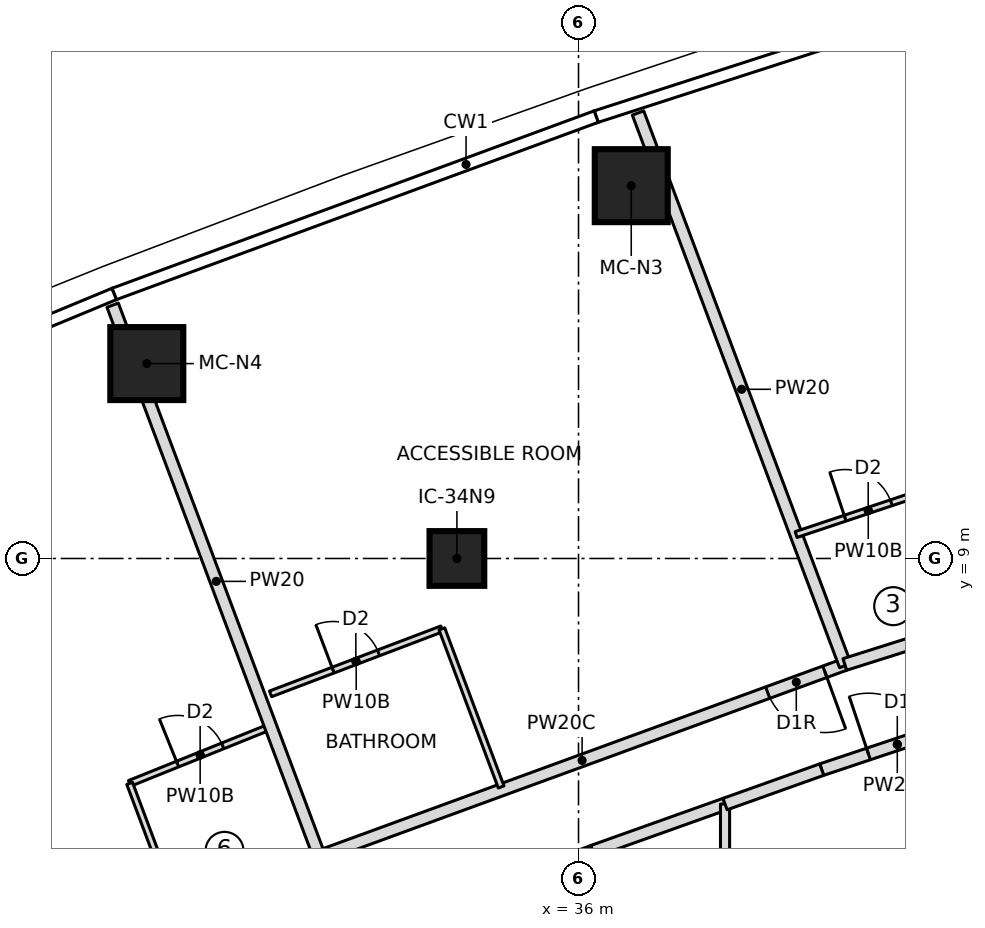
"""IFC4 building model, lengths in metres.
Left out: names, types, materials, properties, quantities, classifications, styles, units other than length and angle.
Written with IfcOpenShell. Run it as: python <this file> out.ifc"""

import sys

from ifc_helpers import new_model, si_unit, direction, frame, frame_2d, origin, origin_2d, place, context, subcontext, project, spatial, rectangle, extrude, element, fill, save


model = new_model("IFC4")
c1 = context("Model", 3, precision=1e-05, world=origin(), true_north=direction((0.0, 1.0)))
c2 = subcontext(c1, "Body", "Model", "MODEL_VIEW")
j1 = project(units=[si_unit("LENGTHUNIT", "METRE"), si_unit("PLANEANGLEUNIT", "RADIAN")], contexts=[c1])
p1 = place(None, origin())
s1 = spatial("IfcSite", under=j1, at=p1, CompositionType="ELEMENT")
p2 = place(p1, origin())
s2 = spatial("IfcBuilding", under=s1, at=p2, CompositionType="ELEMENT")
p3 = place(p2, frame((0.0, 0.0, 242.1)))
s3 = spatial("IfcBuildingStorey", under=s2, at=p3, CompositionType="ELEMENT", Elevation=242.1)
for number, where, z_axis, x_axis in (
    (1, (36.867, 15.132, 0.0), (0.0, 0.0, 1.0), (1.0, 0.0, 0.0)),
    (2, (28.9, 12.205, 0.0), (0.0, 0.0, 1.0), (1.0, 0.0, 0.0)),
):
    element("IfcColumn", number, at=place(p3, frame(where, z_axis=z_axis, x_axis=x_axis)), inside=s3, PredefinedType="COLUMN", context=c2, shape_type="SweptSolid", body=[
        extrude(rectangle(XDim=1.2, YDim=1.2, at=origin_2d()), origin(), (0.0, 0.0, 1.0), 3.55),
    ])
p4 = place(p3, frame((34.0, 9.0, 0.0), z_axis=(0.0, 0.0, 1.0), x_axis=(1.0, 0.0, 0.0)))
e3 = element("IfcColumn", 3, at=p4, inside=s3, PredefinedType="COLUMN", context=c2, shape_type="SweptSolid", body=[
    extrude(rectangle(XDim=0.9, YDim=0.9, at=origin_2d()), origin(), (0.0, 0.0, 1.0), 3.55),
])
p5 = place(p3, frame((28.618, 5.301, 0.0), z_axis=(0.0, 0.0, 1.0), x_axis=(0.92761232595, 0.373544338394, 0.0)))
e4 = element("IfcWall", 4, at=p5, inside=s3, PredefinedType="PARTITIONING", context=c2, shape_type="SweptSolid", body=[
    extrude(rectangle(XDim=2.5, YDim=0.1, at=frame_2d((1.25, 0.0))), origin(), (0.0, 0.0, 1.0), 3.25),
])
p6 = place(p5, frame((0.85, 0.0, 0.0)))
e5 = element("IfcOpeningElement", 5, at=p6, cuts=e4, PredefinedType="OPENING", context=c2, shape_type="SweptSolid", body=[
    extrude(rectangle(XDim=0.8, YDim=2.1, at=frame_2d((0.4, 1.05))), frame((0.0, 0.06, 0.0), z_axis=(0.0, -1.0, 0.0), x_axis=(1.0, 0.0, 0.0)), (0.0, 0.0, 1.0), 0.12),
])
p7 = place(p3, frame((29.417, 3.168, 0.0), z_axis=(0.0, 0.0, 1.0), x_axis=(-0.351064703731, 0.936351202164, 0.0)))
e6 = element("IfcWall", 6, at=p7, inside=s3, PredefinedType="PARTITIONING", context=c2, shape_type="SweptSolid", body=[
    extrude(rectangle(XDim=2.278, YDim=0.1, at=frame_2d((1.139, 0.0))), origin(), (0.0, 0.0, 1.0), 3.25),
])
p8 = place(p3, frame((31.745, 4.081, 0.0), z_axis=(0.0, 0.0, 1.0), x_axis=(-0.351126198992, 0.936328143538, 0.0)))
e7 = element("IfcWall", 7, at=p8, inside=s3, PredefinedType="PARTITIONING", context=c2, shape_type="SweptSolid", body=[
    extrude(rectangle(XDim=9.703, YDim=0.2, at=frame_2d((4.852, 0.0))), origin(), (0.0, 0.0, 1.0), 3.25),
])
p9 = place(p3, frame((40.38, 7.257, 0.0), z_axis=(0.0, 0.0, 1.0), x_axis=(-0.939266239759, -0.343189351305, 0.0)))
e8 = element("IfcWall", 8, at=p9, inside=s3, PredefinedType="PARTITIONING", context=c2, shape_type="SweptSolid", body=[
    extrude(rectangle(XDim=9.2, YDim=0.2, at=frame_2d((4.6, 0.0))), origin(), (0.0, 0.0, 1.0), 3.25),
])
p10 = place(p9, frame((0.35, 0.0, 0.0)))
e9 = element("IfcOpeningElement", 9, at=p10, cuts=e8, PredefinedType="OPENING", context=c2, shape_type="SweptSolid", body=[
    extrude(rectangle(XDim=1.0, YDim=2.1, at=frame_2d((0.5, 1.05))), frame((0.0, 0.11, 0.0), z_axis=(0.0, -1.0, 0.0), x_axis=(1.0, 0.0, 0.0)), (0.0, 0.0, 1.0), 0.22),
])
p11 = place(p3, frame((30.935, 6.773, 0.0), z_axis=(0.0, 0.0, 1.0), x_axis=(0.934929871592, 0.354832545302, 0.0)))
e10 = element("IfcWall", 10, at=p11, inside=s3, PredefinedType="PARTITIONING", context=c2, shape_type="SweptSolid", body=[
    extrude(rectangle(XDim=3.013, YDim=0.1, at=frame_2d((1.506, 0.0))), origin(), (0.0, 0.0, 1.0), 3.25),
])
p12 = place(p11, frame((1.1, 0.0, 0.0)))
e11 = element("IfcOpeningElement", 11, at=p12, cuts=e10, PredefinedType="OPENING", context=c2, shape_type="SweptSolid", body=[
    extrude(rectangle(XDim=0.8, YDim=2.1, at=frame_2d((0.4, 1.05))), frame((0.0, 0.06, 0.0), z_axis=(0.0, -1.0, 0.0), x_axis=(1.0, 0.0, 0.0)), (0.0, 0.0, 1.0), 0.12),
])
p13 = place(p3, frame((33.752, 7.842, 0.0), z_axis=(0.0, 0.0, 1.0), x_axis=(0.351113807562, -0.936332790272, 0.0)))
e12 = element("IfcWall", 12, at=p13, inside=s3, PredefinedType="PARTITIONING", context=c2, shape_type="SweptSolid", body=[
    extrude(rectangle(XDim=2.777, YDim=0.1, at=frame_2d((1.389, 0.0))), origin(), (0.0, 0.0, 1.0), 3.25),
])
p14 = place(p3, frame((40.387, 7.238, 0.0), z_axis=(0.0, 0.0, 1.0), x_axis=(-0.351098633881, 0.936338480084, 0.0)))
e13 = element("IfcWall", 13, at=p14, inside=s3, PredefinedType="PARTITIONING", context=c2, shape_type="SweptSolid", body=[
    extrude(rectangle(XDim=9.707, YDim=0.2, at=frame_2d((4.853, 0.0))), origin(), (0.0, 0.0, 1.0), 3.25),
])
p15 = place(p3, frame((39.579, 9.393, 0.0), z_axis=(0.0, 0.0, 1.0), x_axis=(0.948468383404, 0.316871781141, 0.0)))
e14 = element("IfcWall", 14, at=p15, inside=s3, PredefinedType="PARTITIONING", context=c2, shape_type="SweptSolid", body=[
    extrude(rectangle(XDim=2.502, YDim=0.1, at=frame_2d((1.251, 0.0))), origin(), (0.0, 0.0, 1.0), 3.25),
])
p16 = place(p15, frame((0.85, 0.0, 0.0)))
e15 = element("IfcOpeningElement", 15, at=p16, cuts=e14, PredefinedType="OPENING", context=c2, shape_type="SweptSolid", body=[
    extrude(rectangle(XDim=0.8, YDim=2.1, at=frame_2d((0.4, 1.05))), frame((0.0, 0.06, 0.0), z_axis=(0.0, -1.0, 0.0), x_axis=(1.0, 0.0, 0.0)), (0.0, 0.0, 1.0), 0.12),
])
p17 = place(p3, frame((35.41, 3.872, 0.0), z_axis=(0.0, 0.0, 1.0), x_axis=(0.934902750064, 0.354903998178, 0.0)))
e16 = element("IfcWall", 16, at=p17, inside=s3, PredefinedType="PARTITIONING", context=c2, shape_type="SweptSolid", body=[
    extrude(rectangle(XDim=0.884, YDim=0.2, at=frame_2d((0.442, 0.0))), origin(), (0.0, 0.0, 1.0), 3.25),
])
p18 = place(p3, frame((36.236, 4.186, 0.0), z_axis=(0.0, 0.0, 1.0), x_axis=(0.941897392466, 0.335900732459, 0.0)))
e17 = element("IfcWall", 17, at=p18, inside=s3, PredefinedType="PARTITIONING", context=c2, shape_type="SweptSolid", body=[
    extrude(rectangle(XDim=2.308, YDim=0.2, at=frame_2d((1.154, 0.0))), origin(), (0.0, 0.0, 1.0), 3.25),
])
p19 = place(p3, frame((38.41, -4.961, 0.0), z_axis=(0.0, 0.0, 1.0), x_axis=(0.0, 1.0, 0.0)))
e18 = element("IfcWall", 18, at=p19, inside=s3, PredefinedType="PARTITIONING", context=c2, shape_type="SweptSolid", body=[
    extrude(rectangle(XDim=9.921, YDim=0.15, at=frame_2d((4.961, 0.0))), origin(), (0.0, 0.0, 1.0), 3.25),
])
p20 = place(p3, frame((39.999, 5.527, 0.0), z_axis=(0.0, 0.0, 1.0), x_axis=(0.948459565489, 0.316898173918, 0.0)))
e19 = element("IfcWall", 19, at=p20, inside=s3, PredefinedType="PARTITIONING", context=c2, shape_type="SweptSolid", body=[
    extrude(rectangle(XDim=2.622, YDim=0.2, at=frame_2d((1.311, 0.0))), origin(), (0.0, 0.0, 1.0), 3.25),
])
p21 = place(p20, frame((0.811, 0.0, 0.0)))
e20 = element("IfcOpeningElement", 20, at=p21, cuts=e19, PredefinedType="OPENING", context=c2, shape_type="SweptSolid", body=[
    extrude(rectangle(XDim=1.0, YDim=2.1, at=frame_2d((0.5, 1.05))), frame((0.0, 0.11, 0.0), z_axis=(0.0, -1.0, 0.0), x_axis=(1.0, 0.0, 0.0)), (0.0, 0.0, 1.0), 0.22),
])
p22 = place(p3, frame((38.41, 4.961, 0.0), z_axis=(0.0, 0.0, 1.0), x_axis=(0.941925088036, 0.335823061341, 0.0)))
e21 = element("IfcWall", 21, at=p22, inside=s3, PredefinedType="PARTITIONING", context=c2, shape_type="SweptSolid", body=[
    extrude(rectangle(XDim=1.687, YDim=0.2, at=frame_2d((0.844, 0.0))), origin(), (0.0, 0.0, 1.0), 3.25),
])
p23 = place(p3, frame((40.38, 7.257, 0.0), z_axis=(0.0, 0.0, 1.0), x_axis=(0.953536454425, 0.301277662768, 0.0)))
e22 = element("IfcWall", 22, at=p23, inside=s3, PredefinedType="PARTITIONING", context=c2, shape_type="SweptSolid", body=[
    extrude(rectangle(XDim=8.306, YDim=0.2, at=frame_2d((4.153, 0.0))), origin(), (0.0, 0.0, 1.0), 3.25),
])
p24 = place(p23, frame((2.8, 0.0, 0.0)))
e23 = element("IfcOpeningElement", 23, at=p24, cuts=e22, PredefinedType="OPENING", context=c2, shape_type="SweptSolid", body=[
    extrude(rectangle(XDim=1.5, YDim=2.1, at=frame_2d((0.75, 1.05))), frame((0.0, 0.11, 0.0), z_axis=(0.0, -1.0, 0.0), x_axis=(1.0, 0.0, 0.0)), (0.0, 0.0, 1.0), 0.22),
])
p25 = place(p6, origin())
e24 = element("IfcDoor", 24, at=p25, inside=s3, OperationType="SINGLE_SWING_LEFT", PredefinedType="DOOR", context=c2, shape_type="SweptSolid", body=[
    extrude(rectangle(XDim=0.8, YDim=2.1, at=frame_2d((0.4, 1.05))), frame((0.0, 0.025, 0.0), z_axis=(0.0, -1.0, 0.0), x_axis=(1.0, 0.0, 0.0)), (0.0, 0.0, 1.0), 0.05),
])
fill(e5, e24)
p26 = place(p12, origin())
e25 = element("IfcDoor", 25, at=p26, inside=s3, OperationType="SINGLE_SWING_LEFT", PredefinedType="DOOR", context=c2, shape_type="SweptSolid", body=[
    extrude(rectangle(XDim=0.8, YDim=2.1, at=frame_2d((0.4, 1.05))), frame((0.0, 0.025, 0.0), z_axis=(0.0, -1.0, 0.0), x_axis=(1.0, 0.0, 0.0)), (0.0, 0.0, 1.0), 0.05),
])
fill(e11, e25)
p27 = place(p10, origin())
e26 = element("IfcDoor", 26, at=p27, inside=s3, OperationType="SINGLE_SWING_RIGHT", PredefinedType="DOOR", context=c2, shape_type="SweptSolid", body=[
    extrude(rectangle(XDim=1.0, YDim=2.1, at=frame_2d((0.5, 1.05))), frame((0.0, 0.025, 0.0), z_axis=(0.0, -1.0, 0.0), x_axis=(1.0, 0.0, 0.0)), (0.0, 0.0, 1.0), 0.05),
])
fill(e9, e26)
p28 = place(p16, origin())
e27 = element("IfcDoor", 27, at=p28, inside=s3, OperationType="SINGLE_SWING_LEFT", PredefinedType="DOOR", context=c2, shape_type="SweptSolid", body=[
    extrude(rectangle(XDim=0.8, YDim=2.1, at=frame_2d((0.4, 1.05))), frame((0.0, 0.025, 0.0), z_axis=(0.0, -1.0, 0.0), x_axis=(1.0, 0.0, 0.0)), (0.0, 0.0, 1.0), 0.05),
])
fill(e15, e27)
p29 = place(p21, origin())
e28 = element("IfcDoor", 28, at=p29, inside=s3, OperationType="SINGLE_SWING_LEFT", PredefinedType="DOOR", context=c2, shape_type="SweptSolid", body=[
    extrude(rectangle(XDim=1.0, YDim=2.1, at=frame_2d((0.5, 1.05))), frame((0.0, 0.025, 0.0), z_axis=(0.0, -1.0, 0.0), x_axis=(1.0, 0.0, 0.0)), (0.0, 0.0, 1.0), 0.05),
])
fill(e20, e28)
save(model, sys.argv[1])
